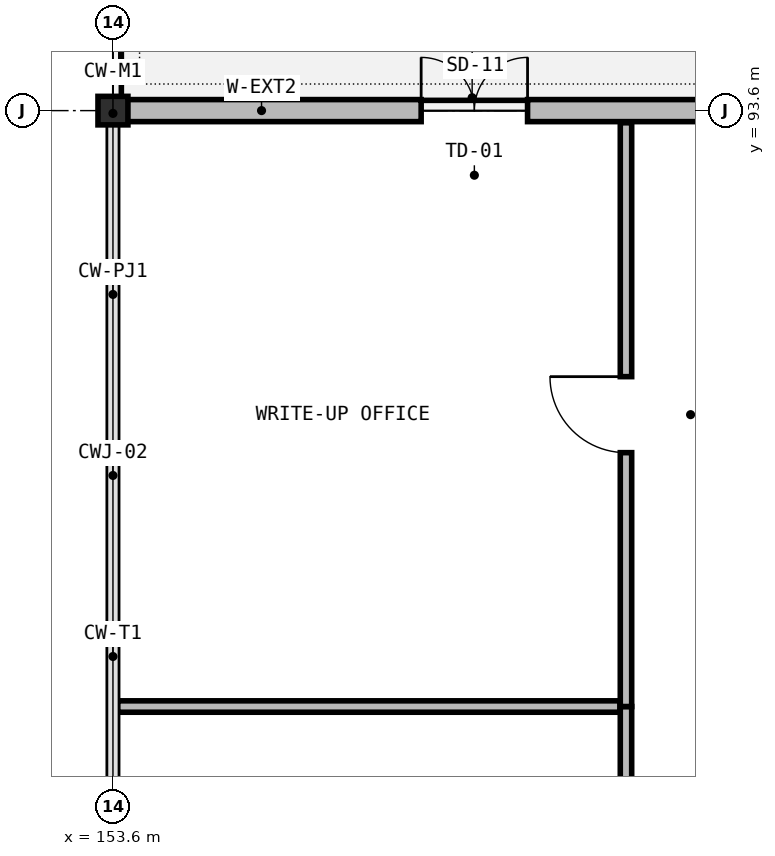
"""IFC4 building model, lengths in metres.
Left out: names, types, materials, properties, quantities, classifications, styles, units other than length and angle.
Written with IfcOpenShell. Run it as: python <this file> out.ifc"""

import sys

from ifc_helpers import new_model, si_unit, direction, frame, frame_2d, origin, origin_2d, place, context, subcontext, project, spatial, rectangle, i_section, extrude, element, fill, save


model = new_model("IFC4")
c1 = context("Model", 3, precision=1e-05, world=origin(), true_north=direction((0.0, 1.0)))
c2 = subcontext(c1, "Body", "Model", "MODEL_VIEW")
j1 = project(units=[si_unit("LENGTHUNIT", "METRE"), si_unit("PLANEANGLEUNIT", "RADIAN")], contexts=[c1])
p1 = place(None, origin())
s1 = spatial("IfcSite", under=j1, at=p1, CompositionType="ELEMENT")
p2 = place(p1, origin())
s2 = spatial("IfcBuilding", under=s1, at=p2, CompositionType="ELEMENT")
p3 = place(p2, frame((0.0, 0.0, 9.8)))
s3 = spatial("IfcBuildingStorey", under=s2, at=p3, CompositionType="ELEMENT", Elevation=9.8)
p4 = place(p3, frame((153.6, 93.6, 0.0), z_axis=(0.0, 0.0, 1.0), x_axis=(1.0, 0.0, 0.0)))
e1 = element("IfcColumn", 1, at=p4, inside=s3, PredefinedType="COLUMN", context=c2, shape_type="SweptSolid", body=[
    extrude(i_section(OverallWidth=0.394, OverallDepth=0.375, WebThickness=0.02, FlangeThickness=0.032, at=origin_2d()), origin(), (0.0, 0.0, 1.0), 4.55),
])
p5 = place(p3, frame((153.455, 93.6, 0.0), z_axis=(0.0, 0.0, 1.0), x_axis=(1.0, 0.0, 0.0)))
e2 = element("IfcWall", 2, at=p5, inside=s3, PredefinedType="SOLIDWALL", context=c2, shape_type="SweptSolid", body=[
    extrude(rectangle(XDim=9.741, YDim=0.29, at=frame_2d((4.871, 0.0))), origin(), (0.0, 0.0, 1.0), 3.811),
])
p6 = place(p5, frame((4.2, 0.0, 0.0)))
e3 = element("IfcOpeningElement", 3, at=p6, cuts=e2, PredefinedType="OPENING", context=c2, shape_type="SweptSolid", body=[
    extrude(rectangle(XDim=1.4, YDim=2.2, at=frame_2d((0.7, 1.1))), frame((0.0, 0.155, 0.0), z_axis=(0.0, -1.0, 0.0), x_axis=(1.0, 0.0, 0.0)), (0.0, 0.0, 1.0), 0.31),
])
p7 = place(p3, frame((160.35, 79.16, 0.0), z_axis=(0.0, 0.0, 1.0), x_axis=(0.0, 1.0, 0.0)))
e4 = element("IfcWall", 4, at=p7, inside=s3, PredefinedType="PARTITIONING", context=c2, shape_type="SweptSolid", body=[
    extrude(rectangle(XDim=6.6, YDim=0.15, at=frame_2d((3.3, 0.0))), origin(), (0.0, 0.0, 1.0), 4.3),
])
p8 = place(p7, frame((2.8, 0.0, 0.0)))
e5 = element("IfcOpeningElement", 5, at=p8, cuts=e4, PredefinedType="OPENING", context=c2, shape_type="SweptSolid", body=[
    extrude(rectangle(XDim=1.0, YDim=2.2, at=frame_2d((0.5, 1.1))), frame((0.0, 0.085, 0.0), z_axis=(0.0, -1.0, 0.0), x_axis=(1.0, 0.0, 0.0)), (0.0, 0.0, 1.0), 0.17),
])
p9 = place(p3, frame((153.66, 85.76, 0.0), z_axis=(0.0, 0.0, 1.0), x_axis=(1.0, 0.0, 0.0)))
e6 = element("IfcWall", 6, at=p9, inside=s3, PredefinedType="PARTITIONING", context=c2, shape_type="SweptSolid", body=[
    extrude(rectangle(XDim=6.61, YDim=0.15, at=frame_2d((3.305, 0.0))), origin(), (0.0, 0.0, 1.0), 4.3),
])
p10 = place(p3, frame((160.35, 85.76, 0.0), z_axis=(0.0, 0.0, 1.0), x_axis=(0.0, 1.0, 0.0)))
e7 = element("IfcWall", 7, at=p10, inside=s3, PredefinedType="PARTITIONING", context=c2, shape_type="SweptSolid", body=[
    extrude(rectangle(XDim=7.68, YDim=0.15, at=frame_2d((3.84, 0.0))), origin(), (0.0, 0.0, 1.0), 4.3),
])
p11 = place(p10, frame((3.34, 0.0, 0.0)))
e8 = element("IfcOpeningElement", 8, at=p11, cuts=e7, PredefinedType="OPENING", context=c2, shape_type="SweptSolid", body=[
    extrude(rectangle(XDim=1.0, YDim=2.2, at=frame_2d((0.5, 1.1))), frame((0.0, 0.085, 0.0), z_axis=(0.0, -1.0, 0.0), x_axis=(1.0, 0.0, 0.0)), (0.0, 0.0, 1.0), 0.17),
])
p12 = place(p6, origin())
e9 = element("IfcDoor", 9, at=p12, inside=s3, OperationType="DOUBLE_DOOR_SINGLE_SWING", PredefinedType="DOOR", context=c2, shape_type="SweptSolid", body=[
    extrude(rectangle(XDim=1.4, YDim=2.2, at=frame_2d((0.7, 1.1))), frame((0.0, 0.025, 0.0), z_axis=(0.0, -1.0, 0.0), x_axis=(1.0, 0.0, 0.0)), (0.0, 0.0, 1.0), 0.05),
])
fill(e3, e9)
p13 = place(p11, origin())
e10 = element("IfcDoor", 10, at=p13, inside=s3, OperationType="SINGLE_SWING_RIGHT", PredefinedType="DOOR", context=c2, shape_type="SweptSolid", body=[
    extrude(rectangle(XDim=1.0, YDim=2.2, at=frame_2d((0.5, 1.1))), frame((0.0, 0.025, 0.0), z_axis=(0.0, -1.0, 0.0), x_axis=(1.0, 0.0, 0.0)), (0.0, 0.0, 1.0), 0.05),
])
fill(e8, e10)
save(model, sys.argv[1])
